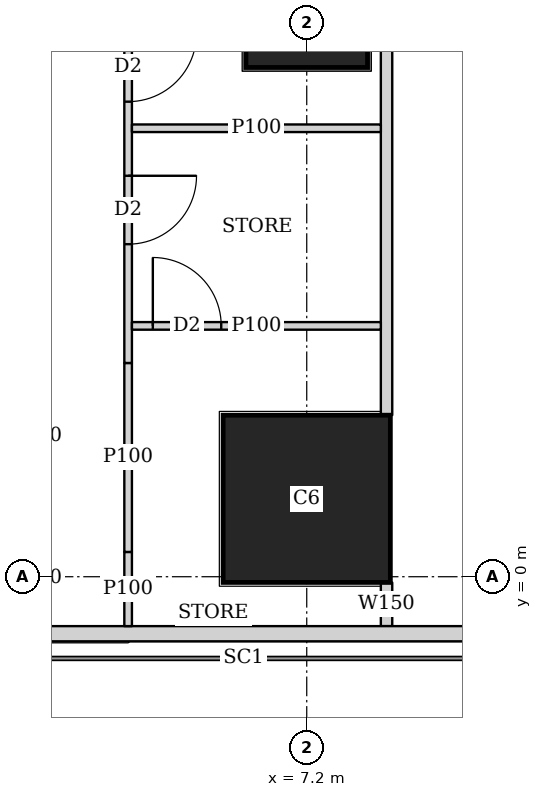
"""IFC4 building model, lengths in metres.
Left out: names, types, materials, properties, quantities, classifications, styles, units other than length and angle.
Written with IfcOpenShell. Run it as: python <this file> out.ifc"""

import sys

from ifc_helpers import new_model, si_unit, direction, frame, frame_2d, origin, origin_2d, place, context, subcontext, project, spatial, rectangle, extrude, element, fill, save


model = new_model("IFC4")
c1 = context("Model", 3, precision=1e-05, world=origin(), true_north=direction((0.0, 1.0)))
c2 = subcontext(c1, "Body", "Model", "MODEL_VIEW")
j1 = project(units=[si_unit("LENGTHUNIT", "METRE"), si_unit("PLANEANGLEUNIT", "RADIAN")], contexts=[c1])
p1 = place(None, origin())
s1 = spatial("IfcSite", under=j1, at=p1, CompositionType="ELEMENT")
p2 = place(p1, origin())
s2 = spatial("IfcBuilding", under=s1, at=p2, CompositionType="ELEMENT")
p3 = place(p2, frame((0.0, 0.0, 100.4)))
s3 = spatial("IfcBuildingStorey", under=s2, at=p3, CompositionType="ELEMENT", Elevation=100.4)
p4 = place(p3, frame((7.2, 1.025, 0.0), z_axis=(0.0, 0.0, 1.0), x_axis=(1.0, 0.0, 0.0)))
e1 = element("IfcColumn", 1, at=p4, inside=s3, PredefinedType="COLUMN", context=c2, shape_type="SweptSolid", body=[
    extrude(rectangle(XDim=2.2, YDim=2.2, at=origin_2d()), origin(), (0.0, 0.0, 1.0), 3.75),
])
p5 = place(p3, frame((7.2, 7.5, 0.0), z_axis=(0.0, 0.0, 1.0), x_axis=(1.0, 0.0, 0.0)))
e2 = element("IfcColumn", 2, at=p5, inside=s3, PredefinedType="COLUMN", context=c2, shape_type="SweptSolid", body=[
    extrude(rectangle(XDim=1.6, YDim=1.6, at=origin_2d()), origin(), (0.0, 0.0, 1.0), 3.75),
])
p6 = place(p3, frame((2.163, -0.75, 0.0), z_axis=(0.0, 0.0, 1.0), x_axis=(1.0, 0.0, 0.0)))
e3 = element("IfcWall", 3, at=p6, inside=s3, PredefinedType="SOLIDWALL", context=c2, shape_type="SweptSolid", body=[
    extrude(rectangle(XDim=45.628, YDim=0.2, at=frame_2d((22.814, 0.0))), origin(), (0.0, 0.0, 1.0), 3.5),
])
p7 = place(p6, frame((9.537, 0.0, 0.9)))
e4 = element("IfcOpeningElement", 4, at=p7, cuts=e3, PredefinedType="OPENING", context=c2, shape_type="SweptSolid", body=[
    extrude(rectangle(XDim=1.8, YDim=1.5, at=frame_2d((0.9, 0.75))), frame((0.0, 0.11, 0.0), z_axis=(0.0, -1.0, 0.0), x_axis=(1.0, 0.0, 0.0)), (0.0, 0.0, 1.0), 0.22),
])
p8 = place(p6, frame((13.137, 0.0, 0.9)))
e5 = element("IfcOpeningElement", 5, at=p8, cuts=e3, PredefinedType="OPENING", context=c2, shape_type="SweptSolid", body=[
    extrude(rectangle(XDim=1.8, YDim=1.5, at=frame_2d((0.9, 0.75))), frame((0.0, 0.11, 0.0), z_axis=(0.0, -1.0, 0.0), x_axis=(1.0, 0.0, 0.0)), (0.0, 0.0, 1.0), 0.22),
])
p9 = place(p6, frame((16.737, 0.0, 0.9)))
e6 = element("IfcOpeningElement", 6, at=p9, cuts=e3, PredefinedType="OPENING", context=c2, shape_type="SweptSolid", body=[
    extrude(rectangle(XDim=1.8, YDim=1.5, at=frame_2d((0.9, 0.75))), frame((0.0, 0.11, 0.0), z_axis=(0.0, -1.0, 0.0), x_axis=(1.0, 0.0, 0.0)), (0.0, 0.0, 1.0), 0.22),
])
p10 = place(p6, frame((20.337, 0.0, 0.9)))
e7 = element("IfcOpeningElement", 7, at=p10, cuts=e3, PredefinedType="OPENING", context=c2, shape_type="SweptSolid", body=[
    extrude(rectangle(XDim=1.8, YDim=1.5, at=frame_2d((0.9, 0.75))), frame((0.0, 0.11, 0.0), z_axis=(0.0, -1.0, 0.0), x_axis=(1.0, 0.0, 0.0)), (0.0, 0.0, 1.0), 0.22),
])
p11 = place(p6, frame((23.937, 0.0, 0.9)))
e8 = element("IfcOpeningElement", 8, at=p11, cuts=e3, PredefinedType="OPENING", context=c2, shape_type="SweptSolid", body=[
    extrude(rectangle(XDim=1.8, YDim=1.5, at=frame_2d((0.9, 0.75))), frame((0.0, 0.11, 0.0), z_axis=(0.0, -1.0, 0.0), x_axis=(1.0, 0.0, 0.0)), (0.0, 0.0, 1.0), 0.22),
])
p12 = place(p6, frame((27.537, 0.0, 0.9)))
e9 = element("IfcOpeningElement", 9, at=p12, cuts=e3, PredefinedType="OPENING", context=c2, shape_type="SweptSolid", body=[
    extrude(rectangle(XDim=1.8, YDim=1.5, at=frame_2d((0.9, 0.75))), frame((0.0, 0.11, 0.0), z_axis=(0.0, -1.0, 0.0), x_axis=(1.0, 0.0, 0.0)), (0.0, 0.0, 1.0), 0.22),
])
p13 = place(p6, frame((31.137, 0.0, 0.9)))
e10 = element("IfcOpeningElement", 10, at=p13, cuts=e3, PredefinedType="OPENING", context=c2, shape_type="SweptSolid", body=[
    extrude(rectangle(XDim=1.8, YDim=1.5, at=frame_2d((0.9, 0.75))), frame((0.0, 0.11, 0.0), z_axis=(0.0, -1.0, 0.0), x_axis=(1.0, 0.0, 0.0)), (0.0, 0.0, 1.0), 0.22),
])
p14 = place(p6, frame((34.737, 0.0, 0.9)))
e11 = element("IfcOpeningElement", 11, at=p14, cuts=e3, PredefinedType="OPENING", context=c2, shape_type="SweptSolid", body=[
    extrude(rectangle(XDim=1.8, YDim=1.5, at=frame_2d((0.9, 0.75))), frame((0.0, 0.11, 0.0), z_axis=(0.0, -1.0, 0.0), x_axis=(1.0, 0.0, 0.0)), (0.0, 0.0, 1.0), 0.22),
])
p15 = place(p3, frame((8.25, -0.65, 0.0), z_axis=(0.0, 0.0, 1.0), x_axis=(0.0, 1.0, 0.0)))
e12 = element("IfcWall", 12, at=p15, inside=s3, PredefinedType="SOLIDWALL", context=c2, shape_type="SweptSolid", body=[
    extrude(rectangle(XDim=0.574, YDim=0.15, at=frame_2d((0.287, 0.0))), origin(), (0.0, 0.0, 1.0), 3.5),
])
p16 = place(p3, frame((8.25, 2.126, 0.0), z_axis=(0.0, 0.0, 1.0), x_axis=(0.0, 1.0, 0.0)))
e13 = element("IfcWall", 13, at=p16, inside=s3, PredefinedType="SOLIDWALL", context=c2, shape_type="SweptSolid", body=[
    extrude(rectangle(XDim=40.773, YDim=0.15, at=frame_2d((20.386, 0.0))), origin(), (0.0, 0.0, 1.0), 3.5),
])
p17 = place(p16, frame((10.286, 0.0, 0.0)))
e14 = element("IfcOpeningElement", 14, at=p17, cuts=e13, PredefinedType="OPENING", context=c2, shape_type="SweptSolid", body=[
    extrude(rectangle(XDim=1.0, YDim=2.1, at=frame_2d((0.5, 1.05))), frame((0.0, 0.085, 0.0), z_axis=(0.0, -1.0, 0.0), x_axis=(1.0, 0.0, 0.0)), (0.0, 0.0, 1.0), 0.17),
])
p18 = place(p16, frame((14.461, 0.0, 0.0)))
e15 = element("IfcOpeningElement", 15, at=p18, cuts=e13, PredefinedType="OPENING", context=c2, shape_type="SweptSolid", body=[
    extrude(rectangle(XDim=1.0, YDim=2.1, at=frame_2d((0.5, 1.05))), frame((0.0, 0.085, 0.0), z_axis=(0.0, -1.0, 0.0), x_axis=(1.0, 0.0, 0.0)), (0.0, 0.0, 1.0), 0.17),
])
p19 = place(p16, frame((25.287, 0.0, 0.0)))
e16 = element("IfcOpeningElement", 16, at=p19, cuts=e13, PredefinedType="OPENING", context=c2, shape_type="SweptSolid", body=[
    extrude(rectangle(XDim=1.0, YDim=2.1, at=frame_2d((0.5, 1.05))), frame((0.0, 0.085, 0.0), z_axis=(0.0, -1.0, 0.0), x_axis=(1.0, 0.0, 0.0)), (0.0, 0.0, 1.0), 0.17),
])
p20 = place(p16, frame((32.787, 0.0, 0.0)))
e17 = element("IfcOpeningElement", 17, at=p20, cuts=e13, PredefinedType="OPENING", context=c2, shape_type="SweptSolid", body=[
    extrude(rectangle(XDim=1.0, YDim=2.1, at=frame_2d((0.5, 1.05))), frame((0.0, 0.085, 0.0), z_axis=(0.0, -1.0, 0.0), x_axis=(1.0, 0.0, 0.0)), (0.0, 0.0, 1.0), 0.17),
])
p21 = place(p3, frame((4.85, -0.65, 0.0), z_axis=(0.0, 0.0, 1.0), x_axis=(0.0, 1.0, 0.0)))
e18 = element("IfcWall", 18, at=p21, inside=s3, PredefinedType="PARTITIONING", context=c2, shape_type="SweptSolid", body=[
    extrude(rectangle(XDim=0.976, YDim=0.1, at=frame_2d((0.488, 0.0))), origin(), (0.0, 0.0, 1.0), 3.5),
])
p22 = place(p3, frame((4.85, 0.326, 0.0), z_axis=(0.0, 0.0, 1.0), x_axis=(0.0, 1.0, 0.0)))
e19 = element("IfcWall", 19, at=p22, inside=s3, PredefinedType="PARTITIONING", context=c2, shape_type="SweptSolid", body=[
    extrude(rectangle(XDim=2.486, YDim=0.1, at=frame_2d((1.243, 0.0))), origin(), (0.0, 0.0, 1.0), 2.05),
])
p23 = place(p3, frame((4.85, 2.812, 0.0), z_axis=(0.0, 0.0, 1.0), x_axis=(0.0, 1.0, 0.0)))
e20 = element("IfcWall", 20, at=p23, inside=s3, PredefinedType="PARTITIONING", context=c2, shape_type="SweptSolid", body=[
    extrude(rectangle(XDim=8.438, YDim=0.1, at=frame_2d((4.219, 0.0))), origin(), (0.0, 0.0, 1.0), 3.5),
])
p24 = place(p23, frame((6.883, 0.0, 0.0)))
e21 = element("IfcOpeningElement", 21, at=p24, cuts=e20, PredefinedType="OPENING", context=c2, shape_type="SweptSolid", body=[
    extrude(rectangle(XDim=0.9, YDim=2.1, at=frame_2d((0.45, 1.05))), frame((0.0, 0.06, 0.0), z_axis=(0.0, -1.0, 0.0), x_axis=(1.0, 0.0, 0.0)), (0.0, 0.0, 1.0), 0.12),
])
p25 = place(p23, frame((3.438, 0.0, 0.0)))
e22 = element("IfcOpeningElement", 22, at=p25, cuts=e20, PredefinedType="OPENING", context=c2, shape_type="SweptSolid", body=[
    extrude(rectangle(XDim=0.9, YDim=2.1, at=frame_2d((0.45, 1.05))), frame((0.0, 0.06, 0.0), z_axis=(0.0, -1.0, 0.0), x_axis=(1.0, 0.0, 0.0)), (0.0, 0.0, 1.0), 0.12),
])
p26 = place(p23, frame((5.008, 0.0, 0.0)))
e23 = element("IfcOpeningElement", 23, at=p26, cuts=e20, PredefinedType="OPENING", context=c2, shape_type="SweptSolid", body=[
    extrude(rectangle(XDim=0.9, YDim=2.1, at=frame_2d((0.45, 1.05))), frame((0.0, 0.06, 0.0), z_axis=(0.0, -1.0, 0.0), x_axis=(1.0, 0.0, 0.0)), (0.0, 0.0, 1.0), 0.12),
])
p27 = place(p23, frame((1.563, 0.0, 0.0)))
e24 = element("IfcOpeningElement", 24, at=p27, cuts=e20, PredefinedType="OPENING", context=c2, shape_type="SweptSolid", body=[
    extrude(rectangle(XDim=0.9, YDim=2.1, at=frame_2d((0.45, 1.05))), frame((0.0, 0.06, 0.0), z_axis=(0.0, -1.0, 0.0), x_axis=(1.0, 0.0, 0.0)), (0.0, 0.0, 1.0), 0.12),
])
p28 = place(p3, frame((4.9, 5.9, 0.0), z_axis=(0.0, 0.0, 1.0), x_axis=(1.0, 0.0, 0.0)))
e25 = element("IfcWall", 25, at=p28, inside=s3, PredefinedType="PARTITIONING", context=c2, shape_type="SweptSolid", body=[
    extrude(rectangle(XDim=3.275, YDim=0.1, at=frame_2d((1.638, 0.0))), origin(), (0.0, 0.0, 1.0), 3.5),
])
p29 = place(p3, frame((8.175, 3.3, 0.0), z_axis=(0.0, 0.0, 1.0), x_axis=(-1.0, 0.0, 0.0)))
e26 = element("IfcWall", 26, at=p29, inside=s3, PredefinedType="PARTITIONING", context=c2, shape_type="SweptSolid", body=[
    extrude(rectangle(XDim=3.275, YDim=0.1, at=frame_2d((1.638, 0.0))), origin(), (0.0, 0.0, 1.0), 3.5),
])
p30 = place(p29, frame((2.1, 0.0, 0.0)))
e27 = element("IfcOpeningElement", 27, at=p30, cuts=e26, PredefinedType="OPENING", context=c2, shape_type="SweptSolid", body=[
    extrude(rectangle(XDim=0.9, YDim=2.1, at=frame_2d((0.45, 1.05))), frame((0.0, 0.06, 0.0), z_axis=(0.0, -1.0, 0.0), x_axis=(1.0, 0.0, 0.0)), (0.0, 0.0, 1.0), 0.12),
])
p31 = place(p25, origin())
e28 = element("IfcDoor", 28, at=p31, inside=s3, OperationType="SINGLE_SWING_LEFT", PredefinedType="DOOR", context=c2, shape_type="SweptSolid", body=[
    extrude(rectangle(XDim=0.9, YDim=2.1, at=frame_2d((0.45, 1.05))), frame((0.0, 0.025, 0.0), z_axis=(0.0, -1.0, 0.0), x_axis=(1.0, 0.0, 0.0)), (0.0, 0.0, 1.0), 0.05),
])
fill(e22, e28)
p32 = place(p27, origin())
e29 = element("IfcDoor", 29, at=p32, inside=s3, OperationType="SINGLE_SWING_LEFT", PredefinedType="DOOR", context=c2, shape_type="SweptSolid", body=[
    extrude(rectangle(XDim=0.9, YDim=2.1, at=frame_2d((0.45, 1.05))), frame((0.0, 0.025, 0.0), z_axis=(0.0, -1.0, 0.0), x_axis=(1.0, 0.0, 0.0)), (0.0, 0.0, 1.0), 0.05),
])
fill(e24, e29)
p33 = place(p30, origin())
e30 = element("IfcDoor", 30, at=p33, inside=s3, OperationType="SINGLE_SWING_LEFT", PredefinedType="DOOR", context=c2, shape_type="SweptSolid", body=[
    extrude(rectangle(XDim=0.9, YDim=2.1, at=frame_2d((0.45, 1.05))), frame((0.0, 0.025, 0.0), z_axis=(0.0, -1.0, 0.0), x_axis=(1.0, 0.0, 0.0)), (0.0, 0.0, 1.0), 0.05),
])
fill(e27, e30)
save(model, sys.argv[1])
